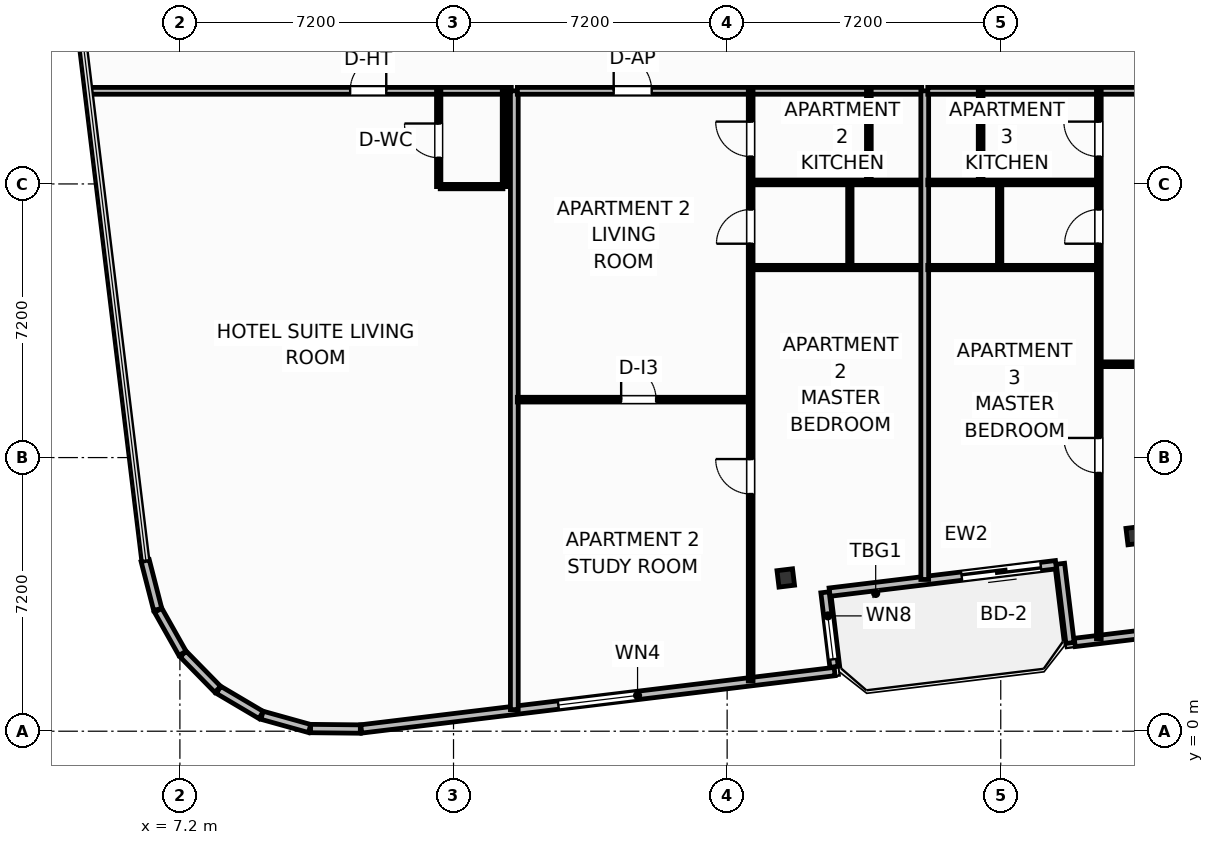
"""IFC4 building model, lengths in metres.
Left out: names, types, materials, properties, quantities, classifications, styles, units other than length and angle.
Written with IfcOpenShell. Run it as: python <this file> out.ifc"""

import sys

from ifc_helpers import new_model, si_unit, direction, frame, frame_2d, origin, origin_2d, place, context, subcontext, project, spatial, rectangle, i_section, extrude, element, fill, save


model = new_model("IFC4")
c1 = context("Model", 3, precision=1e-05, world=origin(), true_north=direction((0.0, 1.0)))
c2 = subcontext(c1, "Body", "Model", "MODEL_VIEW")
j1 = project(units=[si_unit("LENGTHUNIT", "METRE"), si_unit("PLANEANGLEUNIT", "RADIAN")], contexts=[c1])
p1 = place(None, origin())
s1 = spatial("IfcSite", under=j1, at=p1, CompositionType="ELEMENT")
p2 = place(p1, origin())
s2 = spatial("IfcBuilding", under=s1, at=p2, CompositionType="ELEMENT")
p3 = place(p2, frame((0.0, 0.0, 174.6)))
s3 = spatial("IfcBuildingStorey", under=s2, at=p3, CompositionType="ELEMENT", Elevation=174.6)
for number, where, z_axis, x_axis in (
    (1, (23.143, 4.033, 0.0), (0.0, 0.0, 1.0), (0.993, 0.12, 0.0)),
    (2, (32.325, 5.146, 0.0), (0.0, 0.0, 1.0), (0.993, 0.12, 0.0)),
):
    element("IfcColumn", number, at=place(p3, frame(where, z_axis=z_axis, x_axis=x_axis)), inside=s3, PredefinedType="COLUMN", context=c2, shape_type="SweptSolid", body=[
        extrude(i_section(OverallWidth=0.412, OverallDepth=0.435, WebThickness=0.036, FlangeThickness=0.057, FilletRadius=0.025, at=origin_2d()), origin(), (0.0, 0.0, 1.0), 3.7),
    ])
p4 = place(p3, frame((30.252, 4.381, 0.0), z_axis=(0.0, 0.0, 1.0), x_axis=(-0.992735402148, -0.120318000826, 0.0)))
e3 = element("IfcWall", 3, at=p4, inside=s3, PredefinedType="SOLIDWALL", context=c2, shape_type="SweptSolid", body=[
    extrude(rectangle(XDim=6.0, YDim=0.22, at=frame_2d((3.0, 0.0))), origin(), (0.0, 0.0, 1.0), 2.73),
])
p5 = place(p4, frame((0.4, 0.0, 0.0)))
e4 = element("IfcOpeningElement", 4, at=p5, cuts=e3, PredefinedType="OPENING", context=c2, shape_type="SweptSolid", body=[
    extrude(rectangle(XDim=2.1, YDim=2.3, at=frame_2d((1.05, 1.15))), frame((0.0, 0.12, 0.0), z_axis=(0.0, -1.0, 0.0), x_axis=(1.0, 0.0, 0.0)), (0.0, 0.0, 1.0), 0.24),
])
p6 = place(p3, frame((6.286, 4.488, 0.0), z_axis=(0.0, 0.0, 1.0), x_axis=(0.248942347653, -0.968518305219, 0.0)))
e5 = element("IfcWall", 5, at=p6, inside=s3, PredefinedType="SOLIDWALL", context=c2, shape_type="SweptSolid", body=[
    extrude(rectangle(XDim=1.326, YDim=0.22, at=frame_2d((0.663, 0.0))), origin(), (0.0, 0.0, 1.0), 2.73),
])
for number, where, z_axis, x_axis in (
    (6, (6.629, 3.182, 0.0), (0.0, 0.0, 1.0), (0.491, -0.871, 0.0)),
    (7, (7.285, 2.031, 0.0), (0.0, 0.0, 1.0), (0.7, -0.714, 0.0)),
    (8, (8.217, 1.089, 0.0), (0.0, 0.0, 1.0), (0.861, -0.509, 0.0)),
):
    element("IfcWall", number, at=place(p3, frame(where, z_axis=z_axis, x_axis=x_axis)), inside=s3, PredefinedType="SOLIDWALL", context=c2, shape_type="SweptSolid", body=[
        extrude(rectangle(XDim=1.301, YDim=0.22, at=frame_2d((0.65, 0.0))), origin(), (0.0, 0.0, 1.0), 2.73),
    ])
p7 = place(p3, frame((9.361, 0.42, 0.0), z_axis=(0.0, 0.0, 1.0), x_axis=(0.963218895288, -0.268717992997, 0.0)))
e9 = element("IfcWall", 9, at=p7, inside=s3, PredefinedType="SOLIDWALL", context=c2, shape_type="SweptSolid", body=[
    extrude(rectangle(XDim=1.301, YDim=0.22, at=frame_2d((0.65, 0.0))), origin(), (0.0, 0.0, 1.0), 2.73),
])
p8 = place(p3, frame((10.639, 0.07, 0.0), z_axis=(0.0, 0.0, 1.0), x_axis=(0.999947377741, -0.010258740119, 0.0)))
e10 = element("IfcWall", 10, at=p8, inside=s3, PredefinedType="SOLIDWALL", context=c2, shape_type="SweptSolid", body=[
    extrude(rectangle(XDim=1.309, YDim=0.22, at=frame_2d((0.654, 0.0))), origin(), (0.0, 0.0, 1.0), 2.73),
])
p9 = place(p3, frame((11.972, 0.06, 0.0), z_axis=(0.0, 0.0, 1.0), x_axis=(0.992732021049, 0.120345894751, 0.0)))
e11 = element("IfcWall", 11, at=p9, inside=s3, PredefinedType="SOLIDWALL", context=c2, shape_type="SweptSolid", body=[
    extrude(rectangle(XDim=12.547, YDim=0.22, at=frame_2d((6.274, 0.0))), origin(), (0.0, 0.0, 1.0), 2.73),
])
p10 = place(p9, frame((5.224, 0.0, 0.8)))
e12 = element("IfcOpeningElement", 12, at=p10, cuts=e11, PredefinedType="OPENING", context=c2, shape_type="SweptSolid", body=[
    extrude(rectangle(XDim=2.1, YDim=1.75, at=frame_2d((1.05, 0.875))), frame((0.0, 0.12, 0.0), z_axis=(0.0, -1.0, 0.0), x_axis=(1.0, 0.0, 0.0)), (0.0, 0.0, 1.0), 0.24),
])
p11 = place(p3, frame((24.413, 1.694, 0.0), z_axis=(0.0, 0.0, 1.0), x_axis=(-0.120290754542, 0.992738703976, 0.0)))
e13 = element("IfcWall", 13, at=p11, inside=s3, PredefinedType="SOLIDWALL", context=c2, shape_type="SweptSolid", body=[
    extrude(rectangle(XDim=1.975, YDim=0.22, at=frame_2d((0.987, 0.0))), origin(), (0.0, 0.0, 1.0), 2.73),
])
p12 = place(p11, frame((0.2, 0.0, 0.8)))
e14 = element("IfcOpeningElement", 14, at=p12, cuts=e13, PredefinedType="OPENING", context=c2, shape_type="SweptSolid", body=[
    extrude(rectangle(XDim=1.15, YDim=1.4, at=frame_2d((0.575, 0.7))), frame((0.0, 0.12, 0.0), z_axis=(0.0, -1.0, 0.0), x_axis=(1.0, 0.0, 0.0)), (0.0, 0.0, 1.0), 0.24),
])
p13 = place(p3, frame((30.37, 4.406, 0.0), z_axis=(0.0, 0.0, 1.0), x_axis=(0.120327895535, -0.992734202874, 0.0)))
e15 = element("IfcWall", 15, at=p13, inside=s3, PredefinedType="SOLIDWALL", context=c2, shape_type="SweptSolid", body=[
    extrude(rectangle(XDim=2.1, YDim=0.22, at=frame_2d((1.05, 0.0))), origin(), (0.0, 0.0, 1.0), 2.73),
])
p14 = place(p3, frame((30.747, 2.336, 0.0), z_axis=(0.0, 0.0, 1.0), x_axis=(0.992731032022, 0.120354052946, 0.0)))
e16 = element("IfcWall", 16, at=p14, inside=s3, PredefinedType="SOLIDWALL", context=c2, shape_type="SweptSolid", body=[
    extrude(rectangle(XDim=8.035, YDim=0.22, at=frame_2d((4.018, 0.0))), origin(), (0.0, 0.0, 1.0), 2.73),
])
p15 = place(p14, frame((2.968, 0.0, 0.8)))
e17 = element("IfcOpeningElement", 17, at=p15, cuts=e16, PredefinedType="OPENING", context=c2, shape_type="SweptSolid", body=[
    extrude(rectangle(XDim=2.1, YDim=1.75, at=frame_2d((1.05, 0.875))), frame((0.0, 0.12, 0.0), z_axis=(0.0, -1.0, 0.0), x_axis=(1.0, 0.0, 0.0)), (0.0, 0.0, 1.0), 0.24),
])
p16 = place(p3, frame((4.847, 16.85, 0.0), z_axis=(0.0, 0.0, 1.0), x_axis=(1.0, 0.0, 0.0)))
e18 = element("IfcWall", 18, at=p16, inside=s3, PredefinedType="PARTITIONING", context=c2, shape_type="SweptSolid", body=[
    extrude(rectangle(XDim=11.073, YDim=0.18, at=frame_2d((5.537, 0.0))), origin(), (0.0, 0.0, 1.0), 3.45),
])
p17 = place(p16, frame((6.833, 0.0, 0.0)))
e19 = element("IfcOpeningElement", 19, at=p17, cuts=e18, PredefinedType="OPENING", context=c2, shape_type="SweptSolid", body=[
    extrude(rectangle(XDim=0.95, YDim=2.15, at=frame_2d((0.475, 1.075))), frame((0.0, 0.1, 0.0), z_axis=(0.0, -1.0, 0.0), x_axis=(1.0, 0.0, 0.0)), (0.0, 0.0, 1.0), 0.2),
])
p18 = place(p3, frame((14.05, 14.33, 0.0), z_axis=(0.0, 0.0, 1.0), x_axis=(1.0, 0.0, 0.0)))
e20 = element("IfcWall", 20, at=p18, inside=s3, PredefinedType="PARTITIONING", context=c2, shape_type="SweptSolid", body=[
    extrude(rectangle(XDim=1.65, YDim=0.115, at=frame_2d((0.825, 0.0))), origin(), (0.0, 0.0, 1.0), 3.45),
])
p19 = place(p3, frame((14.01, 14.33, 0.0), z_axis=(0.0, 0.0, 1.0), x_axis=(0.0, 1.0, 0.0)))
e21 = element("IfcWall", 21, at=p19, inside=s3, PredefinedType="PARTITIONING", context=c2, shape_type="SweptSolid", body=[
    extrude(rectangle(XDim=2.52, YDim=0.115, at=frame_2d((1.26, 0.0))), origin(), (0.0, 0.0, 1.0), 3.45),
])
p20 = place(p19, frame((0.76, 0.0, 0.0)))
e22 = element("IfcOpeningElement", 22, at=p20, cuts=e21, PredefinedType="OPENING", context=c2, shape_type="SweptSolid", body=[
    extrude(rectangle(XDim=0.9, YDim=2.05, at=frame_2d((0.45, 1.025))), frame((0.0, 0.067, 0.0), z_axis=(0.0, -1.0, 0.0), x_axis=(1.0, 0.0, 0.0)), (0.0, 0.0, 1.0), 0.135),
])
p21 = place(p3, frame((15.74, 14.33, 0.0), z_axis=(0.0, 0.0, 1.0), x_axis=(0.0, 1.0, 0.0)))
e23 = element("IfcWall", 23, at=p21, inside=s3, PredefinedType="PARTITIONING", context=c2, shape_type="SweptSolid", body=[
    extrude(rectangle(XDim=2.52, YDim=0.115, at=frame_2d((1.26, 0.0))), origin(), (0.0, 0.0, 1.0), 3.45),
])
p22 = place(p3, frame((16.0, 0.568, 0.0), z_axis=(0.0, 0.0, 1.0), x_axis=(0.0, 1.0, 0.0)))
e24 = element("IfcWall", 24, at=p22, inside=s3, PredefinedType="PARTITIONING", context=c2, shape_type="SweptSolid", body=[
    extrude(rectangle(XDim=16.282, YDim=0.205, at=frame_2d((8.141, 0.0))), origin(), (0.0, 0.0, 1.0), 3.45),
])
p23 = place(p3, frame((16.08, 8.724, 0.0), z_axis=(0.0, 0.0, 1.0), x_axis=(1.0, 0.0, 0.0)))
e25 = element("IfcWall", 25, at=p23, inside=s3, PredefinedType="PARTITIONING", context=c2, shape_type="SweptSolid", body=[
    extrude(rectangle(XDim=6.069, YDim=0.125, at=frame_2d((3.035, 0.0))), origin(), (0.0, 0.0, 1.0), 3.45),
])
p24 = place(p23, frame((2.731, 0.0, 0.0)))
e26 = element("IfcOpeningElement", 26, at=p24, cuts=e25, PredefinedType="OPENING", context=c2, shape_type="SweptSolid", body=[
    extrude(rectangle(XDim=0.92, YDim=2.05, at=frame_2d((0.46, 1.025))), frame((0.0, 0.073, 0.0), z_axis=(0.0, -1.0, 0.0), x_axis=(1.0, 0.0, 0.0)), (0.0, 0.0, 1.0), 0.145),
])
p25 = place(p3, frame((16.08, 16.85, 0.0), z_axis=(0.0, 0.0, 1.0), x_axis=(1.0, 0.0, 0.0)))
e27 = element("IfcWall", 27, at=p25, inside=s3, PredefinedType="PARTITIONING", context=c2, shape_type="SweptSolid", body=[
    extrude(rectangle(XDim=10.64, YDim=0.18, at=frame_2d((5.32, 0.0))), origin(), (0.0, 0.0, 1.0), 3.45),
])
p26 = place(p25, frame((2.535, 0.0, 0.0)))
e28 = element("IfcOpeningElement", 28, at=p26, cuts=e27, PredefinedType="OPENING", context=c2, shape_type="SweptSolid", body=[
    extrude(rectangle(XDim=1.0, YDim=2.2, at=frame_2d((0.5, 1.1))), frame((0.0, 0.1, 0.0), z_axis=(0.0, -1.0, 0.0), x_axis=(1.0, 0.0, 0.0)), (0.0, 0.0, 1.0), 0.2),
])
p27 = place(p3, frame((22.219, 1.322, 0.0), z_axis=(0.0, 0.0, 1.0), x_axis=(0.0, 1.0, 0.0)))
e29 = element("IfcWall", 29, at=p27, inside=s3, PredefinedType="PARTITIONING", context=c2, shape_type="SweptSolid", body=[
    extrude(rectangle(XDim=15.528, YDim=0.125, at=frame_2d((7.764, 0.0))), origin(), (0.0, 0.0, 1.0), 3.45),
])
p28 = place(p27, frame((4.919, 0.0, 0.0)))
e30 = element("IfcOpeningElement", 30, at=p28, cuts=e29, PredefinedType="OPENING", context=c2, shape_type="SweptSolid", body=[
    extrude(rectangle(XDim=0.92, YDim=2.05, at=frame_2d((0.46, 1.025))), frame((0.0, 0.073, 0.0), z_axis=(0.0, -1.0, 0.0), x_axis=(1.0, 0.0, 0.0)), (0.0, 0.0, 1.0), 0.145),
])
p29 = place(p27, frame((11.505, 0.0, 0.0)))
e31 = element("IfcOpeningElement", 31, at=p29, cuts=e29, PredefinedType="OPENING", context=c2, shape_type="SweptSolid", body=[
    extrude(rectangle(XDim=0.9, YDim=2.05, at=frame_2d((0.45, 1.025))), frame((0.0, 0.073, 0.0), z_axis=(0.0, -1.0, 0.0), x_axis=(1.0, 0.0, 0.0)), (0.0, 0.0, 1.0), 0.145),
])
p30 = place(p27, frame((13.798, 0.0, 0.0)))
e32 = element("IfcOpeningElement", 32, at=p30, cuts=e29, PredefinedType="OPENING", context=c2, shape_type="SweptSolid", body=[
    extrude(rectangle(XDim=0.92, YDim=2.05, at=frame_2d((0.46, 1.025))), frame((0.0, 0.073, 0.0), z_axis=(0.0, -1.0, 0.0), x_axis=(1.0, 0.0, 0.0)), (0.0, 0.0, 1.0), 0.145),
])
p31 = place(p3, frame((22.289, 14.44, 0.0), z_axis=(0.0, 0.0, 1.0), x_axis=(1.0, 0.0, 0.0)))
e33 = element("IfcWall", 33, at=p31, inside=s3, PredefinedType="PARTITIONING", context=c2, shape_type="SweptSolid", body=[
    extrude(rectangle(XDim=4.431, YDim=0.125, at=frame_2d((2.215, 0.0))), origin(), (0.0, 0.0, 1.0), 3.45),
])
p32 = place(p3, frame((22.289, 12.2, 0.0), z_axis=(0.0, 0.0, 1.0), x_axis=(1.0, 0.0, 0.0)))
e34 = element("IfcWall", 34, at=p32, inside=s3, PredefinedType="PARTITIONING", context=c2, shape_type="SweptSolid", body=[
    extrude(rectangle(XDim=4.431, YDim=0.115, at=frame_2d((2.215, 0.0))), origin(), (0.0, 0.0, 1.0), 3.45),
])
p33 = place(p3, frame((25.329, 14.44, 0.0), z_axis=(0.0, 0.0, 1.0), x_axis=(0.0, 1.0, 0.0)))
e35 = element("IfcWall", 35, at=p33, inside=s3, PredefinedType="PARTITIONING", context=c2, shape_type="SweptSolid", body=[
    extrude(rectangle(XDim=2.41, YDim=0.125, at=frame_2d((1.205, 0.0))), origin(), (0.0, 0.0, 1.0), 3.45),
])
p34 = place(p3, frame((24.829, 12.2, 0.0), z_axis=(0.0, 0.0, 1.0), x_axis=(0.0, 1.0, 0.0)))
e36 = element("IfcWall", 36, at=p34, inside=s3, PredefinedType="PARTITIONING", context=c2, shape_type="SweptSolid", body=[
    extrude(rectangle(XDim=2.24, YDim=0.115, at=frame_2d((1.12, 0.0))), origin(), (0.0, 0.0, 1.0), 3.45),
])
p35 = place(p3, frame((26.8, 3.993, 0.0), z_axis=(0.0, 0.0, 1.0), x_axis=(0.0, 1.0, 0.0)))
e37 = element("IfcWall", 37, at=p35, inside=s3, PredefinedType="PARTITIONING", context=c2, shape_type="SweptSolid", body=[
    extrude(rectangle(XDim=12.857, YDim=0.205, at=frame_2d((6.429, 0.0))), origin(), (0.0, 0.0, 1.0), 3.45),
])
p36 = place(p3, frame((31.451, 9.656, 0.0), z_axis=(0.0, 0.0, 1.0), x_axis=(1.0, 0.0, 0.0)))
e38 = element("IfcWall", 38, at=p36, inside=s3, PredefinedType="PARTITIONING", context=c2, shape_type="SweptSolid", body=[
    extrude(rectangle(XDim=6.069, YDim=0.125, at=frame_2d((3.035, 0.0))), origin(), (0.0, 0.0, 1.0), 3.45),
])
p37 = place(p36, frame((2.731, 0.0, 0.0)))
e39 = element("IfcOpeningElement", 39, at=p37, cuts=e38, PredefinedType="OPENING", context=c2, shape_type="SweptSolid", body=[
    extrude(rectangle(XDim=0.92, YDim=2.05, at=frame_2d((0.46, 1.025))), frame((0.0, 0.073, 0.0), z_axis=(0.0, -1.0, 0.0), x_axis=(1.0, 0.0, 0.0)), (0.0, 0.0, 1.0), 0.145),
])
p38 = place(p3, frame((26.88, 16.85, 0.0), z_axis=(0.0, 0.0, 1.0), x_axis=(1.0, 0.0, 0.0)))
e40 = element("IfcWall", 40, at=p38, inside=s3, PredefinedType="PARTITIONING", context=c2, shape_type="SweptSolid", body=[
    extrude(rectangle(XDim=10.64, YDim=0.18, at=frame_2d((5.32, 0.0))), origin(), (0.0, 0.0, 1.0), 3.45),
])
p39 = place(p38, frame((7.105, 0.0, 0.0)))
e41 = element("IfcOpeningElement", 41, at=p39, cuts=e40, PredefinedType="OPENING", context=c2, shape_type="SweptSolid", body=[
    extrude(rectangle(XDim=1.0, YDim=2.2, at=frame_2d((0.5, 1.1))), frame((0.0, 0.1, 0.0), z_axis=(0.0, -1.0, 0.0), x_axis=(1.0, 0.0, 0.0)), (0.0, 0.0, 1.0), 0.2),
])
p40 = place(p3, frame((31.381, 2.433, 0.0), z_axis=(0.0, 0.0, 1.0), x_axis=(0.0, 1.0, 0.0)))
e42 = element("IfcWall", 42, at=p40, inside=s3, PredefinedType="PARTITIONING", context=c2, shape_type="SweptSolid", body=[
    extrude(rectangle(XDim=14.417, YDim=0.125, at=frame_2d((7.208, 0.0))), origin(), (0.0, 0.0, 1.0), 3.45),
])
p41 = place(p40, frame((4.364, 0.0, 0.0)))
e43 = element("IfcOpeningElement", 43, at=p41, cuts=e42, PredefinedType="OPENING", context=c2, shape_type="SweptSolid", body=[
    extrude(rectangle(XDim=0.92, YDim=2.05, at=frame_2d((0.46, 1.025))), frame((0.0, 0.073, 0.0), z_axis=(0.0, -1.0, 0.0), x_axis=(1.0, 0.0, 0.0)), (0.0, 0.0, 1.0), 0.145),
])
p42 = place(p40, frame((10.395, 0.0, 0.0)))
e44 = element("IfcOpeningElement", 44, at=p42, cuts=e42, PredefinedType="OPENING", context=c2, shape_type="SweptSolid", body=[
    extrude(rectangle(XDim=0.9, YDim=2.05, at=frame_2d((0.45, 1.025))), frame((0.0, 0.073, 0.0), z_axis=(0.0, -1.0, 0.0), x_axis=(1.0, 0.0, 0.0)), (0.0, 0.0, 1.0), 0.145),
])
p43 = place(p40, frame((12.687, 0.0, 0.0)))
e45 = element("IfcOpeningElement", 45, at=p43, cuts=e42, PredefinedType="OPENING", context=c2, shape_type="SweptSolid", body=[
    extrude(rectangle(XDim=0.92, YDim=2.05, at=frame_2d((0.46, 1.025))), frame((0.0, 0.073, 0.0), z_axis=(0.0, -1.0, 0.0), x_axis=(1.0, 0.0, 0.0)), (0.0, 0.0, 1.0), 0.145),
])
p44 = place(p3, frame((26.88, 14.44, 0.0), z_axis=(0.0, 0.0, 1.0), x_axis=(1.0, 0.0, 0.0)))
e46 = element("IfcWall", 46, at=p44, inside=s3, PredefinedType="PARTITIONING", context=c2, shape_type="SweptSolid", body=[
    extrude(rectangle(XDim=4.431, YDim=0.125, at=frame_2d((2.215, 0.0))), origin(), (0.0, 0.0, 1.0), 3.45),
])
p45 = place(p3, frame((26.88, 12.2, 0.0), z_axis=(0.0, 0.0, 1.0), x_axis=(1.0, 0.0, 0.0)))
e47 = element("IfcWall", 47, at=p45, inside=s3, PredefinedType="PARTITIONING", context=c2, shape_type="SweptSolid", body=[
    extrude(rectangle(XDim=4.431, YDim=0.115, at=frame_2d((2.215, 0.0))), origin(), (0.0, 0.0, 1.0), 3.45),
])
p46 = place(p3, frame((28.271, 14.44, 0.0), z_axis=(0.0, 0.0, 1.0), x_axis=(0.0, 1.0, 0.0)))
e48 = element("IfcWall", 48, at=p46, inside=s3, PredefinedType="PARTITIONING", context=c2, shape_type="SweptSolid", body=[
    extrude(rectangle(XDim=2.41, YDim=0.125, at=frame_2d((1.205, 0.0))), origin(), (0.0, 0.0, 1.0), 3.45),
])
p47 = place(p3, frame((28.771, 12.2, 0.0), z_axis=(0.0, 0.0, 1.0), x_axis=(0.0, 1.0, 0.0)))
e49 = element("IfcWall", 49, at=p47, inside=s3, PredefinedType="PARTITIONING", context=c2, shape_type="SweptSolid", body=[
    extrude(rectangle(XDim=2.24, YDim=0.115, at=frame_2d((1.12, 0.0))), origin(), (0.0, 0.0, 1.0), 3.45),
])
p48 = place(p5, origin())
e50 = element("IfcDoor", 50, at=p48, inside=s3, OperationType="SLIDING_TO_LEFT", PredefinedType="DOOR", context=c2, shape_type="SweptSolid", body=[
    extrude(rectangle(XDim=2.1, YDim=2.3, at=frame_2d((1.05, 1.15))), frame((0.0, 0.025, 0.0), z_axis=(0.0, -1.0, 0.0), x_axis=(1.0, 0.0, 0.0)), (0.0, 0.0, 1.0), 0.05),
])
fill(e4, e50)
p49 = place(p10, origin())
e51 = element("IfcWindow", 51, at=p49, inside=s3, PartitioningType="SINGLE_PANEL", PredefinedType="WINDOW", context=c2, shape_type="SweptSolid", body=[
    extrude(rectangle(XDim=2.1, YDim=1.75, at=frame_2d((1.05, 0.875))), frame((0.0, 0.03, 0.0), z_axis=(0.0, -1.0, 0.0), x_axis=(1.0, 0.0, 0.0)), (0.0, 0.0, 1.0), 0.06),
])
fill(e12, e51)
p50 = place(p17, origin())
e52 = element("IfcDoor", 52, at=p50, inside=s3, OperationType="SINGLE_SWING_RIGHT", PredefinedType="DOOR", context=c2, shape_type="SweptSolid", body=[
    extrude(rectangle(XDim=0.95, YDim=2.15, at=frame_2d((0.475, 1.075))), frame((0.0, 0.025, 0.0), z_axis=(0.0, -1.0, 0.0), x_axis=(1.0, 0.0, 0.0)), (0.0, 0.0, 1.0), 0.05),
])
fill(e19, e52)
p51 = place(p20, origin())
e53 = element("IfcDoor", 53, at=p51, inside=s3, OperationType="SINGLE_SWING_RIGHT", PredefinedType="DOOR", context=c2, shape_type="SweptSolid", body=[
    extrude(rectangle(XDim=0.9, YDim=2.05, at=frame_2d((0.45, 1.025))), frame((0.0, 0.025, 0.0), z_axis=(0.0, -1.0, 0.0), x_axis=(1.0, 0.0, 0.0)), (0.0, 0.0, 1.0), 0.05),
])
fill(e22, e53)
p52 = place(p24, origin())
e54 = element("IfcDoor", 54, at=p52, inside=s3, OperationType="SINGLE_SWING_LEFT", PredefinedType="DOOR", context=c2, shape_type="SweptSolid", body=[
    extrude(rectangle(XDim=0.92, YDim=2.05, at=frame_2d((0.46, 1.025))), frame((0.0, 0.025, 0.0), z_axis=(0.0, -1.0, 0.0), x_axis=(1.0, 0.0, 0.0)), (0.0, 0.0, 1.0), 0.05),
])
fill(e26, e54)
p53 = place(p26, origin())
e55 = element("IfcDoor", 55, at=p53, inside=s3, OperationType="SINGLE_SWING_LEFT", PredefinedType="DOOR", context=c2, shape_type="SweptSolid", body=[
    extrude(rectangle(XDim=1.0, YDim=2.2, at=frame_2d((0.5, 1.1))), frame((0.0, 0.025, 0.0), z_axis=(0.0, -1.0, 0.0), x_axis=(1.0, 0.0, 0.0)), (0.0, 0.0, 1.0), 0.05),
])
fill(e28, e55)
p54 = place(p28, origin())
e56 = element("IfcDoor", 56, at=p54, inside=s3, OperationType="SINGLE_SWING_RIGHT", PredefinedType="DOOR", context=c2, shape_type="SweptSolid", body=[
    extrude(rectangle(XDim=0.92, YDim=2.05, at=frame_2d((0.46, 1.025))), frame((0.0, 0.025, 0.0), z_axis=(0.0, -1.0, 0.0), x_axis=(1.0, 0.0, 0.0)), (0.0, 0.0, 1.0), 0.05),
])
fill(e30, e56)
p55 = place(p29, origin())
e57 = element("IfcDoor", 57, at=p55, inside=s3, OperationType="SINGLE_SWING_LEFT", PredefinedType="DOOR", context=c2, shape_type="SweptSolid", body=[
    extrude(rectangle(XDim=0.9, YDim=2.05, at=frame_2d((0.45, 1.025))), frame((0.0, 0.025, 0.0), z_axis=(0.0, -1.0, 0.0), x_axis=(1.0, 0.0, 0.0)), (0.0, 0.0, 1.0), 0.05),
])
fill(e31, e57)
p56 = place(p30, origin())
e58 = element("IfcDoor", 58, at=p56, inside=s3, OperationType="SINGLE_SWING_RIGHT", PredefinedType="DOOR", context=c2, shape_type="SweptSolid", body=[
    extrude(rectangle(XDim=0.92, YDim=2.05, at=frame_2d((0.46, 1.025))), frame((0.0, 0.025, 0.0), z_axis=(0.0, -1.0, 0.0), x_axis=(1.0, 0.0, 0.0)), (0.0, 0.0, 1.0), 0.05),
])
fill(e32, e58)
p57 = place(p41, origin())
e59 = element("IfcDoor", 59, at=p57, inside=s3, OperationType="SINGLE_SWING_RIGHT", PredefinedType="DOOR", context=c2, shape_type="SweptSolid", body=[
    extrude(rectangle(XDim=0.92, YDim=2.05, at=frame_2d((0.46, 1.025))), frame((0.0, 0.025, 0.0), z_axis=(0.0, -1.0, 0.0), x_axis=(1.0, 0.0, 0.0)), (0.0, 0.0, 1.0), 0.05),
])
fill(e43, e59)
p58 = place(p42, origin())
e60 = element("IfcDoor", 60, at=p58, inside=s3, OperationType="SINGLE_SWING_LEFT", PredefinedType="DOOR", context=c2, shape_type="SweptSolid", body=[
    extrude(rectangle(XDim=0.9, YDim=2.05, at=frame_2d((0.45, 1.025))), frame((0.0, 0.025, 0.0), z_axis=(0.0, -1.0, 0.0), x_axis=(1.0, 0.0, 0.0)), (0.0, 0.0, 1.0), 0.05),
])
fill(e44, e60)
p59 = place(p43, origin())
e61 = element("IfcDoor", 61, at=p59, inside=s3, OperationType="SINGLE_SWING_RIGHT", PredefinedType="DOOR", context=c2, shape_type="SweptSolid", body=[
    extrude(rectangle(XDim=0.92, YDim=2.05, at=frame_2d((0.46, 1.025))), frame((0.0, 0.025, 0.0), z_axis=(0.0, -1.0, 0.0), x_axis=(1.0, 0.0, 0.0)), (0.0, 0.0, 1.0), 0.05),
])
fill(e45, e61)
p60 = place(p12, origin())
e62 = element("IfcWindow", 62, at=p60, inside=s3, PartitioningType="SINGLE_PANEL", PredefinedType="WINDOW", context=c2, shape_type="SweptSolid", body=[
    extrude(rectangle(XDim=1.15, YDim=1.4, at=frame_2d((0.575, 0.7))), frame((0.0, 0.03, 0.0), z_axis=(0.0, -1.0, 0.0), x_axis=(1.0, 0.0, 0.0)), (0.0, 0.0, 1.0), 0.06),
])
fill(e14, e62)
save(model, sys.argv[1])
